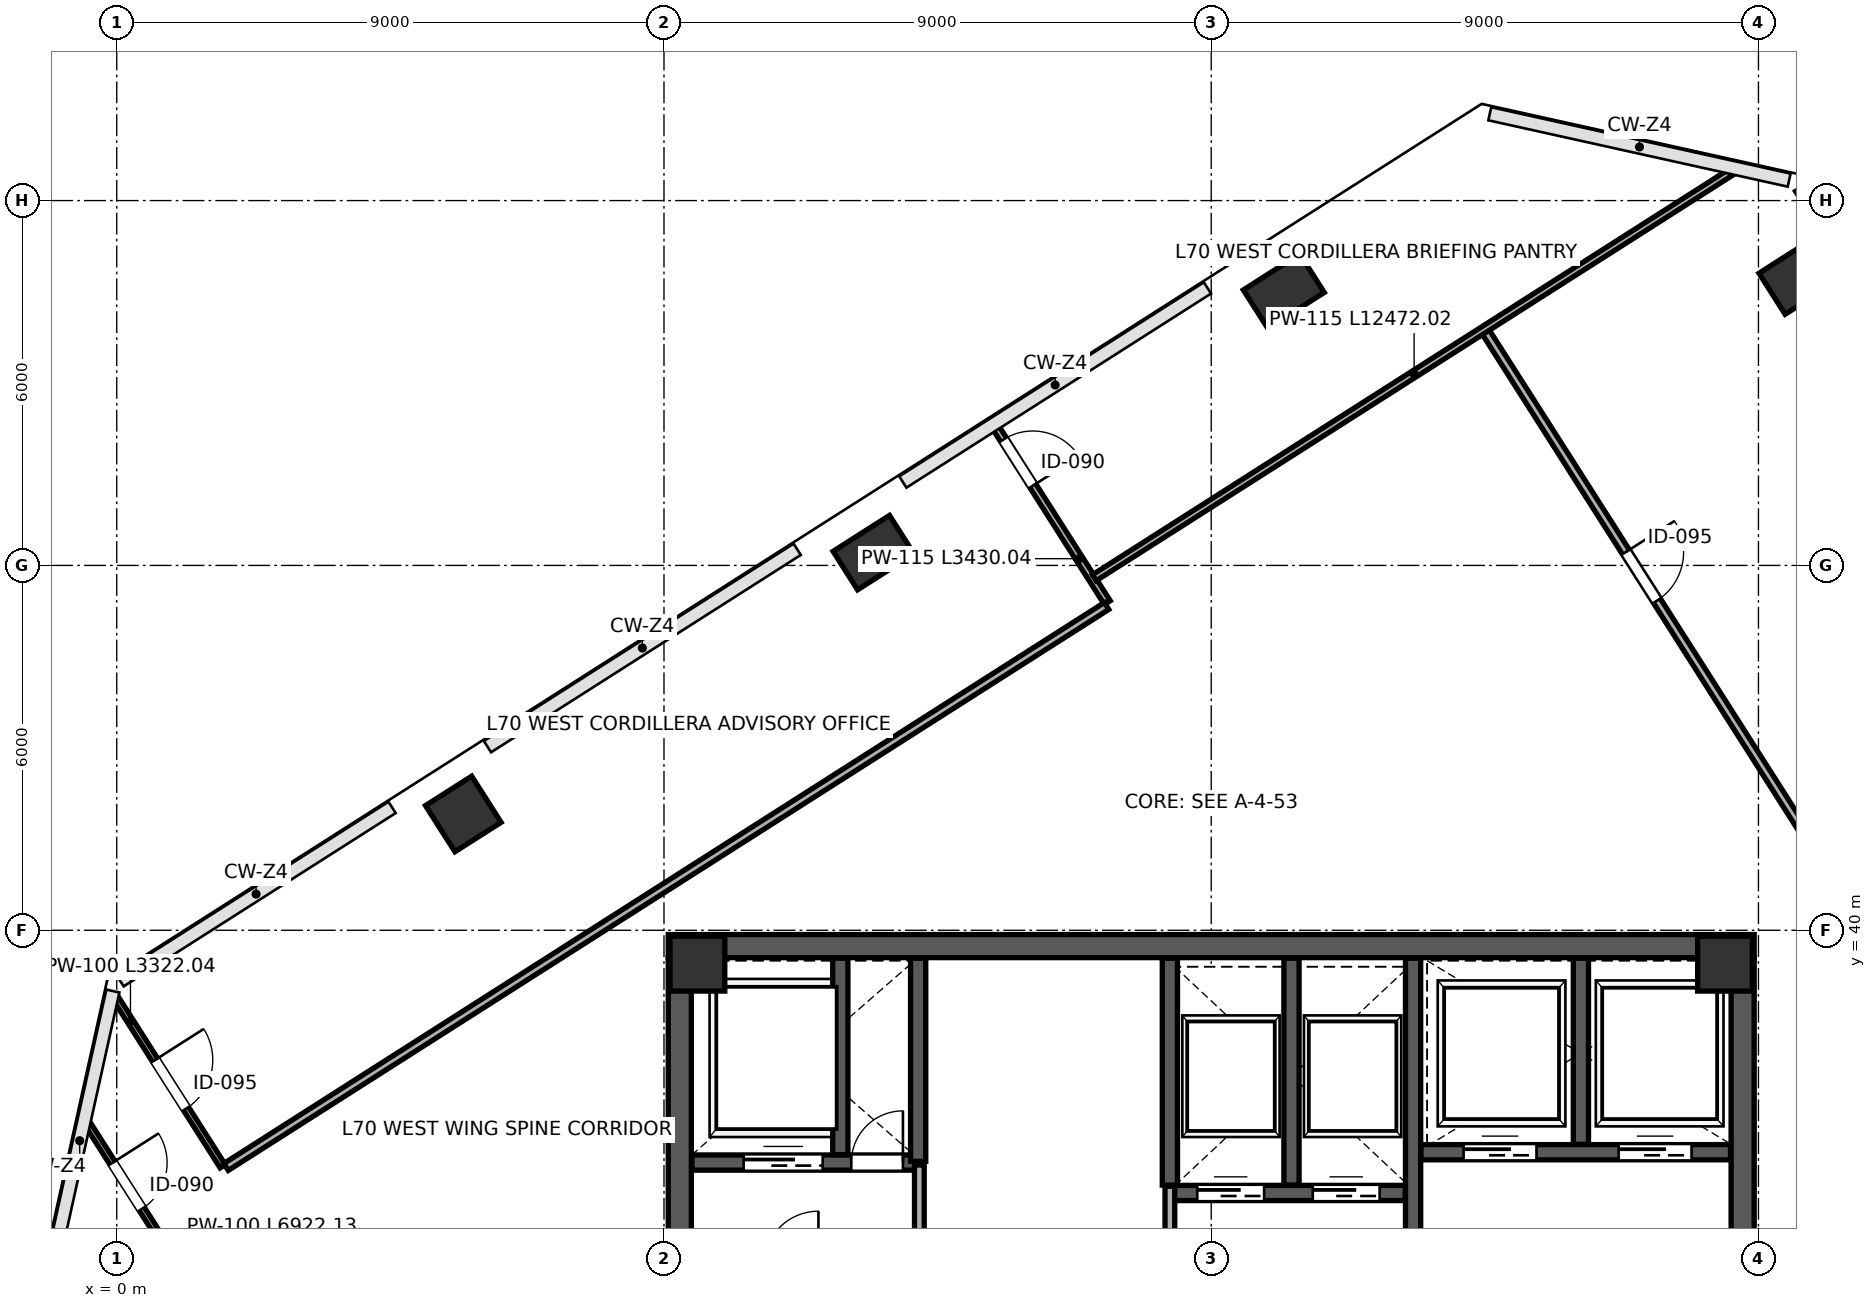
"""IFC4 building model, lengths in metres.
Left out: names, types, materials, properties, quantities, classifications, styles, units other than length and angle.
Written with IfcOpenShell. Run it as: python <this file> out.ifc"""

import sys

from ifc_helpers import new_model, si_unit, direction, frame, frame_2d, origin, origin_2d, place, context, subcontext, project, spatial, rectangle, extrude, source, transform, mapped, element, fill, save


model = new_model("IFC4")
c1 = context("Model", 3, precision=1e-05, world=origin(), true_north=direction((0.0, 1.0)))
c2 = subcontext(c1, "Body", "Model", "MODEL_VIEW")
j1 = project(units=[si_unit("LENGTHUNIT", "METRE"), si_unit("PLANEANGLEUNIT", "RADIAN")], contexts=[c1])
p1 = place(None, origin())
s1 = spatial("IfcSite", under=j1, at=p1, CompositionType="ELEMENT")
p2 = place(p1, origin())
s2 = spatial("IfcBuilding", under=s1, at=p2, CompositionType="ELEMENT")
p3 = place(p2, frame((0.0, 0.0, 311.4)))
s3 = spatial("IfcBuildingStorey", under=s2, at=p3, CompositionType="ELEMENT", Elevation=311.4)
m1 = source(origin(), c2, "Body", "SweptSolid", [
    extrude(rectangle(XDim=0.9, YDim=0.9, at=origin_2d()), origin(), (0.0, 0.0, 1.0), 4.199),
])
for number, where, z_axis, x_axis in (
    (1, (9.55, 39.45, 0.001), (0.0, 0.0, 1.0), (1.0, 0.0, 0.0)),
    (2, (26.45, 39.45, 0.001), (0.0, 0.0, 1.0), (1.0, 0.0, 0.0)),
):
    element("IfcColumn", number, at=place(p3, frame(where, z_axis=z_axis, x_axis=x_axis)), inside=s3, PredefinedType="COLUMN", context=c2, shape_type="MappedRepresentation", body=[
        mapped(m1, transform((0.0, 0.0, 0.0), scale=1.0)),
    ])
m2 = source(origin(), c2, "Body", "SweptSolid", [
    extrude(rectangle(XDim=0.8, YDim=0.8, at=origin_2d()), origin(), (0.0, 0.0, 1.0), 4.199),
])
p4 = place(p3, frame((27.561, 50.683, 0.001), z_axis=(0.0, 0.0, 1.0), x_axis=(-0.537299608347, 0.843391445813, 0.0)))
e3 = element("IfcColumn", 3, at=p4, inside=s3, PredefinedType="COLUMN", context=c2, shape_type="MappedRepresentation", body=[
    mapped(m2, transform((0.0, 0.0, 0.0), scale=1.0)),
])
m3 = source(origin(), c2, "Body", "SweptSolid", [
    extrude(rectangle(XDim=0.9, YDim=0.9, at=origin_2d()), origin(), (0.0, 0.0, 1.0), 4.199),
])
p5 = place(p3, frame((5.699, 41.913, 0.001), z_axis=(0.0, 0.0, 1.0), x_axis=(-0.537299608347, 0.843391445813, 0.0)))
e4 = element("IfcColumn", 4, at=p5, inside=s3, PredefinedType="COLUMN", context=c2, shape_type="MappedRepresentation", body=[
    mapped(m3, transform((0.0, 0.0, 0.0), scale=1.0)),
])
m4 = source(origin(), c2, "Body", "SweptSolid", [
    extrude(rectangle(XDim=0.75, YDim=1.1, at=origin_2d()), origin(), (0.0, 0.0, 1.0), 4.199),
])
for number, where, z_axis, x_axis in (
    (5, (12.447, 46.211, 0.001), (0.0, 0.0, 1.0), (-0.537, 0.843, 0.0)),
    (6, (19.194, 50.51, 0.001), (0.0, 0.0, 1.0), (-0.537, 0.843, 0.0)),
):
    element("IfcColumn", number, at=place(p3, frame(where, z_axis=z_axis, x_axis=x_axis)), inside=s3, PredefinedType="PILASTER", context=c2, shape_type="MappedRepresentation", body=[
        mapped(m4, transform((0.0, 0.0, 0.0), scale=1.0)),
    ])
p6 = place(p3, frame((9.26, 24.45, 0.0), z_axis=(0.0, 0.0, 1.0), x_axis=(0.0, 1.0, 0.0)))
e7 = element("IfcWall", 7, at=p6, inside=s3, PredefinedType="SHEAR", context=c2, shape_type="SweptSolid", body=[
    extrude(rectangle(XDim=15.1, YDim=0.38, at=frame_2d((7.55, 0.0))), origin(), (0.0, 0.0, 1.0), 3.96),
])
p7 = place(p6, frame((8.7, 0.0, 0.0)))
e8 = element("IfcOpeningElement", 8, at=p7, cuts=e7, PredefinedType="OPENING", context=c2, shape_type="SweptSolid", body=[
    extrude(rectangle(XDim=1.15, YDim=2.2, at=frame_2d((0.575, 1.1))), frame((0.0, 0.2, 0.0), z_axis=(0.0, -1.0, 0.0), x_axis=(1.0, 0.0, 0.0)), (0.0, 0.0, 1.0), 0.4),
])
p8 = place(p3, frame((26.74, 24.45, 0.0), z_axis=(0.0, 0.0, 1.0), x_axis=(0.0, 1.0, 0.0)))
e9 = element("IfcWall", 9, at=p8, inside=s3, PredefinedType="SHEAR", context=c2, shape_type="SweptSolid", body=[
    extrude(rectangle(XDim=15.1, YDim=0.38, at=frame_2d((7.55, 0.0))), origin(), (0.0, 0.0, 1.0), 3.96),
])
p9 = place(p8, frame((8.6, 0.0, 0.0)))
e10 = element("IfcOpeningElement", 10, at=p9, cuts=e9, PredefinedType="OPENING", context=c2, shape_type="SweptSolid", body=[
    extrude(rectangle(XDim=1.15, YDim=2.2, at=frame_2d((0.575, 1.1))), frame((0.0, 0.2, 0.0), z_axis=(0.0, -1.0, 0.0), x_axis=(1.0, 0.0, 0.0)), (0.0, 0.0, 1.0), 0.4),
])
p10 = place(p3, frame((9.07, 39.74, 0.0), z_axis=(0.0, 0.0, 1.0), x_axis=(1.0, 0.0, 0.0)))
e11 = element("IfcWall", 11, at=p10, inside=s3, PredefinedType="SHEAR", context=c2, shape_type="SweptSolid", body=[
    extrude(rectangle(XDim=17.86, YDim=0.38, at=frame_2d((8.93, 0.0))), origin(), (0.0, 0.0, 1.0), 3.96),
])
p11 = place(p3, frame((21.32, 32.12, 0.0), z_axis=(0.0, 0.0, 1.0), x_axis=(0.0, 1.0, 0.0)))
e12 = element("IfcWall", 12, at=p11, inside=s3, PredefinedType="SHEAR", context=c2, shape_type="SweptSolid", body=[
    extrude(rectangle(XDim=7.42, YDim=0.25, at=frame_2d((3.71, 0.0))), origin(), (0.0, 0.0, 1.0), 3.96),
])
p12 = place(p11, frame((1.4, 0.0, 0.0)))
e13 = element("IfcOpeningElement", 13, at=p12, cuts=e12, PredefinedType="OPENING", context=c2, shape_type="SweptSolid", body=[
    extrude(rectangle(XDim=1.15, YDim=2.2, at=frame_2d((0.575, 1.1))), frame((0.0, 0.135, 0.0), z_axis=(0.0, -1.0, 0.0), x_axis=(1.0, 0.0, 0.0)), (0.0, 0.0, 1.0), 0.27),
])
p13 = place(p3, frame((9.46, 36.18, 0.0), z_axis=(0.0, 0.0, 1.0), x_axis=(1.0, 0.0, 0.0)))
e14 = element("IfcWall", 14, at=p13, inside=s3, PredefinedType="SHEAR", context=c2, shape_type="SweptSolid", body=[
    extrude(rectangle(XDim=3.79, YDim=0.25, at=frame_2d((1.895, 0.0))), origin(), (0.0, 0.0, 1.0), 3.96),
])
p14 = place(p13, frame((2.62, 0.0, 0.0)))
e15 = element("IfcOpeningElement", 15, at=p14, cuts=e14, PredefinedType="OPENING", context=c2, shape_type="SweptSolid", body=[
    extrude(rectangle(XDim=0.85, YDim=2.1, at=frame_2d((0.425, 1.05))), frame((0.0, 0.135, 0.0), z_axis=(0.0, -1.0, 0.0), x_axis=(1.0, 0.0, 0.0)), (0.0, 0.0, 1.0), 0.27),
])
p15 = place(p13, frame((0.85, 0.0, 0.0)))
e16 = element("IfcOpeningElement", 16, at=p15, cuts=e14, PredefinedType="OPENING", context=c2, shape_type="SweptSolid", body=[
    extrude(rectangle(XDim=1.3, YDim=2.25, at=frame_2d((0.65, 1.125))), frame((0.0, 0.135, 0.0), z_axis=(0.0, -1.0, 0.0), x_axis=(1.0, 0.0, 0.0)), (0.0, 0.0, 1.0), 0.27),
])
p16 = place(p3, frame((11.9, 36.31, 0.0), z_axis=(0.0, 0.0, 1.0), x_axis=(0.0, 1.0, 0.0)))
e17 = element("IfcWall", 17, at=p16, inside=s3, PredefinedType="SHEAR", context=c2, shape_type="SweptSolid", body=[
    extrude(rectangle(XDim=3.23, YDim=0.25, at=frame_2d((1.615, 0.0))), origin(), (0.0, 0.0, 1.0), 3.96),
])
p17 = place(p3, frame((21.45, 36.35, 0.0), z_axis=(0.0, 0.0, 1.0), x_axis=(1.0, 0.0, 0.0)))
e18 = element("IfcWall", 18, at=p17, inside=s3, PredefinedType="SHEAR", context=c2, shape_type="SweptSolid", body=[
    extrude(rectangle(XDim=5.09, YDim=0.25, at=frame_2d((2.545, 0.0))), origin(), (0.0, 0.0, 1.0), 3.96),
])
p18 = place(p17, frame((0.7, 0.0, 0.0)))
e19 = element("IfcOpeningElement", 19, at=p18, cuts=e18, PredefinedType="OPENING", context=c2, shape_type="SweptSolid", body=[
    extrude(rectangle(XDim=1.2, YDim=2.2, at=frame_2d((0.6, 1.1))), frame((0.0, 0.135, 0.0), z_axis=(0.0, -1.0, 0.0), x_axis=(1.0, 0.0, 0.0)), (0.0, 0.0, 1.0), 0.27),
])
p19 = place(p17, frame((3.25, 0.0, 0.0)))
e20 = element("IfcOpeningElement", 20, at=p19, cuts=e18, PredefinedType="OPENING", context=c2, shape_type="SweptSolid", body=[
    extrude(rectangle(XDim=1.2, YDim=2.2, at=frame_2d((0.6, 1.1))), frame((0.0, 0.135, 0.0), z_axis=(0.0, -1.0, 0.0), x_axis=(1.0, 0.0, 0.0)), (0.0, 0.0, 1.0), 0.27),
])
p20 = place(p3, frame((24.08, 36.48, 0.0), z_axis=(0.0, 0.0, 1.0), x_axis=(0.0, 1.0, 0.0)))
e21 = element("IfcWall", 21, at=p20, inside=s3, PredefinedType="SHEAR", context=c2, shape_type="SweptSolid", body=[
    extrude(rectangle(XDim=3.06, YDim=0.25, at=frame_2d((1.53, 0.0))), origin(), (0.0, 0.0, 1.0), 3.96),
])
p21 = place(p3, frame((13.18, 36.2, 0.0), z_axis=(0.0, 0.0, 1.0), x_axis=(0.0, 1.0, 0.0)))
e22 = element("IfcWall", 22, at=p21, inside=s3, PredefinedType="SHEAR", context=c2, shape_type="SweptSolid", body=[
    extrude(rectangle(XDim=3.34, YDim=0.25, at=frame_2d((1.67, 0.0))), origin(), (0.0, 0.0, 1.0), 3.96),
])
p22 = place(p3, frame((17.32, 35.68, 0.0), z_axis=(0.0, 0.0, 1.0), x_axis=(1.0, 0.0, 0.0)))
e23 = element("IfcWall", 23, at=p22, inside=s3, PredefinedType="SHEAR", context=c2, shape_type="SweptSolid", body=[
    extrude(rectangle(XDim=3.87, YDim=0.25, at=frame_2d((1.935, 0.0))), origin(), (0.0, 0.0, 1.0), 3.96),
])
p23 = place(p22, frame((0.45, 0.0, 0.0)))
e24 = element("IfcOpeningElement", 24, at=p23, cuts=e23, PredefinedType="OPENING", context=c2, shape_type="SweptSolid", body=[
    extrude(rectangle(XDim=1.1, YDim=2.2, at=frame_2d((0.55, 1.1))), frame((0.0, 0.135, 0.0), z_axis=(0.0, -1.0, 0.0), x_axis=(1.0, 0.0, 0.0)), (0.0, 0.0, 1.0), 0.27),
])
p24 = place(p22, frame((2.35, 0.0, 0.0)))
e25 = element("IfcOpeningElement", 25, at=p24, cuts=e23, PredefinedType="OPENING", context=c2, shape_type="SweptSolid", body=[
    extrude(rectangle(XDim=1.1, YDim=2.2, at=frame_2d((0.55, 1.1))), frame((0.0, 0.135, 0.0), z_axis=(0.0, -1.0, 0.0), x_axis=(1.0, 0.0, 0.0)), (0.0, 0.0, 1.0), 0.27),
])
for number, where, z_axis, x_axis in (
    (26, (17.32, 35.81, 0.0), (0.0, 0.0, 1.0), (0.0, 1.0, 0.0)),
    (27, (19.32, 35.81, 0.0), (0.0, 0.0, 1.0), (0.0, 1.0, 0.0)),
):
    element("IfcWall", number, at=place(p3, frame(where, z_axis=z_axis, x_axis=x_axis)), inside=s3, PredefinedType="SHEAR", context=c2, shape_type="SweptSolid", body=[
        extrude(rectangle(XDim=3.73, YDim=0.25, at=frame_2d((1.865, 0.0))), origin(), (0.0, 0.0, 1.0), 3.96),
    ])
p25 = place(p3, frame((13.2, 34.57, 0.0), z_axis=(0.0, 0.0, 1.0), x_axis=(0.0, 1.0, 0.0)))
e28 = element("IfcWall", 28, at=p25, inside=s3, PredefinedType="PARTITIONING", context=c2, shape_type="SweptSolid", body=[
    extrude(rectangle(XDim=1.57, YDim=0.16, at=frame_2d((0.785, 0.0))), origin(), (0.0, 0.0, 1.0), 3.96),
])
p26 = place(p3, frame((17.32, 33.86, 0.0), z_axis=(0.0, 0.0, 1.0), x_axis=(0.0, 1.0, 0.0)))
e29 = element("IfcWall", 29, at=p26, inside=s3, PredefinedType="PARTITIONING", context=c2, shape_type="SweptSolid", body=[
    extrude(rectangle(XDim=1.93, YDim=0.16, at=frame_2d((0.965, 0.0))), origin(), (0.0, 0.0, 1.0), 3.96),
])
p27 = place(p3, frame((-0.502, 36.85, 0.0), z_axis=(0.0, 0.0, 1.0), x_axis=(0.537309039539, -0.843385437407, 0.0)))
e30 = element("IfcWall", 30, at=p27, inside=s3, PredefinedType="PARTITIONING", context=c2, shape_type="SweptSolid", body=[
    extrude(rectangle(XDim=6.922, YDim=0.1, at=frame_2d((3.461, 0.0))), origin(), (0.0, 0.0, 1.0), 3.96),
])
p28 = place(p27, frame((0.8, 0.0, 0.0)))
e31 = element("IfcOpeningElement", 31, at=p28, cuts=e30, PredefinedType="OPENING", context=c2, shape_type="SweptSolid", body=[
    extrude(rectangle(XDim=0.9, YDim=2.15, at=frame_2d((0.45, 1.075))), frame((0.0, 0.06, 0.0), z_axis=(0.0, -1.0, 0.0), x_axis=(1.0, 0.0, 0.0)), (0.0, 0.0, 1.0), 0.12),
])
p29 = place(p27, frame((5.3, 0.0, 0.0)))
e32 = element("IfcOpeningElement", 32, at=p29, cuts=e30, PredefinedType="OPENING", context=c2, shape_type="SweptSolid", body=[
    extrude(rectangle(XDim=0.95, YDim=2.15, at=frame_2d((0.475, 1.075))), frame((0.0, 0.06, 0.0), z_axis=(0.0, -1.0, 0.0), x_axis=(1.0, 0.0, 0.0)), (0.0, 0.0, 1.0), 0.12),
])
p30 = place(p3, frame((22.509, 49.847, 0.0), z_axis=(0.0, 0.0, 1.0), x_axis=(0.537290700932, -0.843397120396, 0.0)))
e33 = element("IfcWall", 33, at=p30, inside=s3, PredefinedType="PARTITIONING", context=c2, shape_type="SweptSolid", body=[
    extrude(rectangle(XDim=20.77, YDim=0.135, at=frame_2d((10.385, 0.0))), origin(), (0.0, 0.0, 1.0), 3.96),
])
p31 = place(p30, frame((4.3, 0.0, 0.0)))
e34 = element("IfcOpeningElement", 34, at=p31, cuts=e33, PredefinedType="OPENING", context=c2, shape_type="SweptSolid", body=[
    extrude(rectangle(XDim=0.95, YDim=2.15, at=frame_2d((0.475, 1.075))), frame((0.0, 0.078, 0.0), z_axis=(0.0, -1.0, 0.0), x_axis=(1.0, 0.0, 0.0)), (0.0, 0.0, 1.0), 0.155),
])
p32 = place(p3, frame((14.448, 48.281, 0.0), z_axis=(0.0, 0.0, 1.0), x_axis=(0.537285301829, -0.843400559899, 0.0)))
e35 = element("IfcWall", 35, at=p32, inside=s3, PredefinedType="PARTITIONING", context=c2, shape_type="SweptSolid", body=[
    extrude(rectangle(XDim=3.43, YDim=0.115, at=frame_2d((1.715, 0.0))), origin(), (0.0, 0.0, 1.0), 3.295),
])
p33 = place(p32, frame((0.25, 0.0, 0.0)))
e36 = element("IfcOpeningElement", 36, at=p33, cuts=e35, PredefinedType="OPENING", context=c2, shape_type="SweptSolid", body=[
    extrude(rectangle(XDim=0.9, YDim=2.15, at=frame_2d((0.45, 1.075))), frame((0.0, 0.067, 0.0), z_axis=(0.0, -1.0, 0.0), x_axis=(1.0, 0.0, 0.0)), (0.0, 0.0, 1.0), 0.135),
])
p34 = place(p3, frame((-0.042, 38.921, 0.0), z_axis=(0.0, 0.0, 1.0), x_axis=(0.537298651026, -0.843392055693, 0.0)))
e37 = element("IfcWall", 37, at=p34, inside=s3, PredefinedType="PARTITIONING", context=c2, shape_type="SweptSolid", body=[
    extrude(rectangle(XDim=3.322, YDim=0.1, at=frame_2d((1.661, 0.0))), origin(), (0.0, 0.0, 1.0), 3.96),
])
p35 = place(p34, frame((1.25, 0.0, 0.0)))
e38 = element("IfcOpeningElement", 38, at=p35, cuts=e37, PredefinedType="OPENING", context=c2, shape_type="SweptSolid", body=[
    extrude(rectangle(XDim=0.95, YDim=2.15, at=frame_2d((0.475, 1.075))), frame((0.0, 0.06, 0.0), z_axis=(0.0, -1.0, 0.0), x_axis=(1.0, 0.0, 0.0)), (0.0, 0.0, 1.0), 0.12),
])
p36 = place(p3, frame((1.798, 36.107, 0.0), z_axis=(0.0, 0.0, 1.0), x_axis=(0.843396745572, 0.537291289301, 0.0)))
e39 = element("IfcWall", 39, at=p36, inside=s3, PredefinedType="PARTITIONING", context=c2, shape_type="SweptSolid", body=[
    extrude(rectangle(XDim=17.17, YDim=0.135, at=frame_2d((8.585, 0.0))), origin(), (0.0, 0.0, 1.0), 3.96),
])
p37 = place(p3, frame((16.077, 45.797, 0.0), z_axis=(0.0, 0.0, 1.0), x_axis=(0.843392973199, 0.537297210824, 0.0)))
e40 = element("IfcWall", 40, at=p37, inside=s3, PredefinedType="PARTITIONING", context=c2, shape_type="SweptSolid", body=[
    extrude(rectangle(XDim=12.472, YDim=0.115, at=frame_2d((6.236, 0.0))), origin(), (0.0, 0.0, 1.0), 3.96),
])
m5 = source(origin(), c2, "Body", "SweptSolid", [
    extrude(rectangle(XDim=0.85, YDim=2.1, at=frame_2d((0.425, 1.05))), frame((0.0, 0.025, 0.0), z_axis=(0.0, -1.0, 0.0), x_axis=(1.0, 0.0, 0.0)), (0.0, 0.0, 1.0), 0.05),
])
p38 = place(p14, origin())
e41 = element("IfcDoor", 41, at=p38, inside=s3, OperationType="SINGLE_SWING_RIGHT", PredefinedType="DOOR", context=c2, shape_type="MappedRepresentation", body=[
    mapped(m5, transform((0.0, 0.0, 0.0), scale=1.0)),
])
fill(e15, e41)
m6 = source(origin(), c2, "Body", "SweptSolid", [
    extrude(rectangle(XDim=1.1, YDim=2.2, at=frame_2d((0.55, 1.1))), frame((0.0, 0.025, 0.0), z_axis=(0.0, -1.0, 0.0), x_axis=(1.0, 0.0, 0.0)), (0.0, 0.0, 1.0), 0.05),
])
p39 = place(p23, origin())
e42 = element("IfcDoor", 42, at=p39, inside=s3, OperationType="SLIDING_TO_LEFT", PredefinedType="DOOR", context=c2, shape_type="MappedRepresentation", body=[
    mapped(m6, transform((0.0, 0.0, 0.0), scale=1.0)),
])
fill(e24, e42)
p40 = place(p24, origin())
e43 = element("IfcDoor", 43, at=p40, inside=s3, OperationType="SLIDING_TO_RIGHT", PredefinedType="DOOR", context=c2, shape_type="MappedRepresentation", body=[
    mapped(m6, transform((0.0, 0.0, 0.0), scale=1.0)),
])
fill(e25, e43)
m7 = source(origin(), c2, "Body", "SweptSolid", [
    extrude(rectangle(XDim=1.2, YDim=2.2, at=frame_2d((0.6, 1.1))), frame((0.0, 0.025, 0.0), z_axis=(0.0, -1.0, 0.0), x_axis=(1.0, 0.0, 0.0)), (0.0, 0.0, 1.0), 0.05),
])
p41 = place(p18, origin())
e44 = element("IfcDoor", 44, at=p41, inside=s3, OperationType="SLIDING_TO_LEFT", PredefinedType="DOOR", context=c2, shape_type="MappedRepresentation", body=[
    mapped(m7, transform((0.0, 0.0, 0.0), scale=1.0)),
])
fill(e19, e44)
p42 = place(p19, origin())
e45 = element("IfcDoor", 45, at=p42, inside=s3, OperationType="SLIDING_TO_RIGHT", PredefinedType="DOOR", context=c2, shape_type="MappedRepresentation", body=[
    mapped(m7, transform((0.0, 0.0, 0.0), scale=1.0)),
])
fill(e20, e45)
m8 = source(origin(), c2, "Body", "SweptSolid", [
    extrude(rectangle(XDim=1.3, YDim=2.25, at=frame_2d((0.65, 1.125))), frame((0.0, 0.025, 0.0), z_axis=(0.0, -1.0, 0.0), x_axis=(1.0, 0.0, 0.0)), (0.0, 0.0, 1.0), 0.05),
])
p43 = place(p15, origin())
e46 = element("IfcDoor", 46, at=p43, inside=s3, OperationType="SLIDING_TO_LEFT", PredefinedType="DOOR", context=c2, shape_type="MappedRepresentation", body=[
    mapped(m8, transform((0.0, 0.0, 0.0), scale=1.0)),
])
fill(e16, e46)
m9 = source(origin(), c2, "Body", "SweptSolid", [
    extrude(rectangle(XDim=0.9, YDim=2.15, at=frame_2d((0.45, 1.075))), frame((0.0, 0.025, 0.0), z_axis=(0.0, -1.0, 0.0), x_axis=(1.0, 0.0, 0.0)), (0.0, 0.0, 1.0), 0.05),
])
p44 = place(p28, origin())
e47 = element("IfcDoor", 47, at=p44, inside=s3, OperationType="SINGLE_SWING_LEFT", PredefinedType="DOOR", context=c2, shape_type="MappedRepresentation", body=[
    mapped(m9, transform((0.0, 0.0, 0.0), scale=1.0)),
])
fill(e31, e47)
m10 = source(origin(), c2, "Body", "SweptSolid", [
    extrude(rectangle(XDim=0.95, YDim=2.15, at=frame_2d((0.475, 1.075))), frame((0.0, 0.025, 0.0), z_axis=(0.0, -1.0, 0.0), x_axis=(1.0, 0.0, 0.0)), (0.0, 0.0, 1.0), 0.05),
])
p45 = place(p31, origin())
e48 = element("IfcDoor", 48, at=p45, inside=s3, OperationType="SINGLE_SWING_LEFT", PredefinedType="DOOR", context=c2, shape_type="MappedRepresentation", body=[
    mapped(m10, transform((0.0, 0.0, 0.0), scale=1.0)),
])
fill(e34, e48)
p46 = place(p35, origin())
e49 = element("IfcDoor", 49, at=p46, inside=s3, OperationType="SINGLE_SWING_LEFT", PredefinedType="DOOR", context=c2, shape_type="MappedRepresentation", body=[
    mapped(m10, transform((0.0, 0.0, 0.0), scale=1.0)),
])
fill(e38, e49)
p47 = place(p33, origin())
e50 = element("IfcDoor", 50, at=p47, inside=s3, OperationType="SINGLE_SWING_RIGHT", PredefinedType="DOOR", context=c2, shape_type="MappedRepresentation", body=[
    mapped(m9, transform((0.0, 0.0, 0.0), scale=1.0)),
])
fill(e36, e50)
save(model, sys.argv[1])
